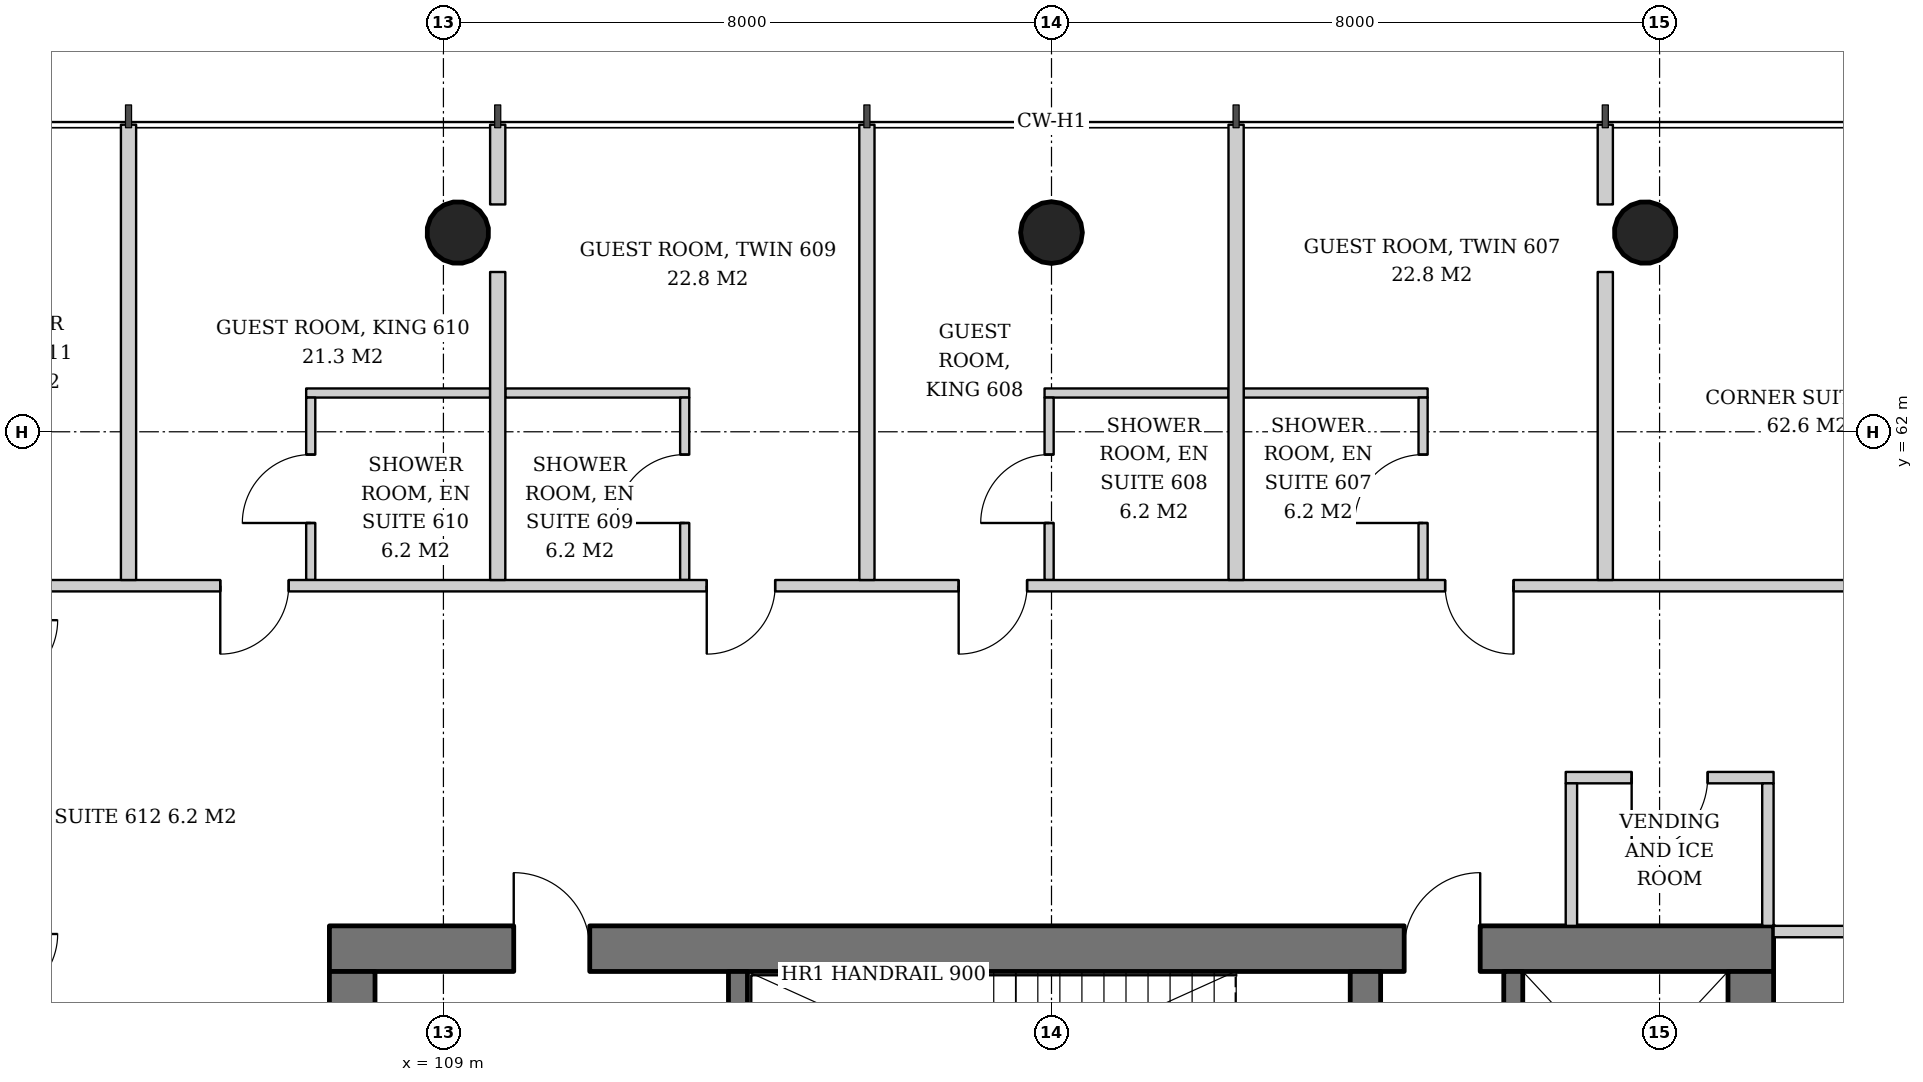
"""IFC4 building model, lengths in metres.
Left out: names, types, materials, properties, quantities, classifications, styles, units other than length and angle.
Written with IfcOpenShell. Run it as: python <this file> out.ifc"""

import sys

from ifc_helpers import new_model, si_unit, direction, frame, frame_2d, origin, origin_2d, place, context, subcontext, project, spatial, rectangle, hollow_circle, extrude, element, fill, save


model = new_model("IFC4")
c1 = context("Model", 3, precision=1e-05, world=origin(), true_north=direction((0.0, 1.0)))
c2 = subcontext(c1, "Body", "Model", "MODEL_VIEW")
j1 = project(units=[si_unit("LENGTHUNIT", "METRE"), si_unit("PLANEANGLEUNIT", "RADIAN")], contexts=[c1])
p1 = place(None, origin())
s1 = spatial("IfcSite", under=j1, at=p1, CompositionType="ELEMENT")
p2 = place(p1, origin())
s2 = spatial("IfcBuilding", under=s1, at=p2, CompositionType="ELEMENT")
p3 = place(p2, frame((0.0, 0.0, 28.6)))
s3 = spatial("IfcBuildingStorey", under=s2, at=p3, CompositionType="ELEMENT", Elevation=28.6)
p4 = place(p3, frame((124.836, 64.672, 0.0), z_axis=(-0.02149908433, -0.04306234503, 0.998841040313), x_axis=(0.894693706707, -0.446680166538, 0.0)))
e1 = element("IfcColumn", 1, at=p4, inside=s3, PredefinedType="COLUMN", context=c2, shape_type="SweptSolid", body=[
    extrude(hollow_circle(Radius=0.406, WallThickness=0.03, at=origin_2d()), origin(), (0.0, 0.0, 1.0), 3.804),
])
p5 = place(p3, frame((117.0, 64.672, 0.0), z_axis=(0.0, -0.043072300418, 0.999071957837), x_axis=(1.0, 0.0, 0.0)))
e2 = element("IfcColumn", 2, at=p5, inside=s3, PredefinedType="COLUMN", context=c2, shape_type="SweptSolid", body=[
    extrude(hollow_circle(Radius=0.406, WallThickness=0.03, at=origin_2d()), origin(), (0.0, 0.0, 1.0), 3.803),
])
p6 = place(p3, frame((109.164, 64.672, 0.0), z_axis=(0.02149908433, -0.04306234503, 0.998841040313), x_axis=(0.894693706707, 0.446680166538, 0.0)))
e3 = element("IfcColumn", 3, at=p6, inside=s3, PredefinedType="COLUMN", context=c2, shape_type="SweptSolid", body=[
    extrude(hollow_circle(Radius=0.406, WallThickness=0.03, at=origin_2d()), origin(), (0.0, 0.0, 1.0), 3.804),
])
p7 = place(p3, frame((107.5, 55.2, 0.0), z_axis=(0.0, 0.0, 1.0), x_axis=(1.0, 0.0, 0.0)))
e4 = element("IfcWall", 4, at=p7, inside=s3, PredefinedType="SHEAR", context=c2, shape_type="SweptSolid", body=[
    extrude(rectangle(XDim=19.0, YDim=0.6, at=frame_2d((9.5, 0.0))), origin(), (0.0, 0.0, 1.0), 3.8),
])
p8 = place(p7, frame((14.14, 0.0, 0.0)))
e5 = element("IfcOpeningElement", 5, at=p8, cuts=e4, PredefinedType="OPENING", context=c2, shape_type="SweptSolid", body=[
    extrude(rectangle(XDim=1.0, YDim=2.1, at=frame_2d((0.5, 1.05))), frame((0.0, 0.31, 0.0), z_axis=(0.0, -1.0, 0.0), x_axis=(1.0, 0.0, 0.0)), (0.0, 0.0, 1.0), 0.62),
])
p9 = place(p7, frame((2.425, 0.0, 0.0)))
e6 = element("IfcOpeningElement", 6, at=p9, cuts=e4, PredefinedType="OPENING", context=c2, shape_type="SweptSolid", body=[
    extrude(rectangle(XDim=1.0, YDim=2.1, at=frame_2d((0.5, 1.05))), frame((0.0, 0.31, 0.0), z_axis=(0.0, -1.0, 0.0), x_axis=(1.0, 0.0, 0.0)), (0.0, 0.0, 1.0), 0.62),
])
p10 = place(p3, frame((107.8, 37.1, 0.0), z_axis=(0.0, 0.0, 1.0), x_axis=(0.0, 1.0, 0.0)))
e7 = element("IfcWall", 7, at=p10, inside=s3, PredefinedType="SHEAR", context=c2, shape_type="SweptSolid", body=[
    extrude(rectangle(XDim=17.8, YDim=0.6, at=frame_2d((8.9, 0.0))), origin(), (0.0, 0.0, 1.0), 3.8),
])
p11 = place(p10, frame((8.0, 0.0, 0.0)))
e8 = element("IfcOpeningElement", 8, at=p11, cuts=e7, PredefinedType="OPENING", context=c2, shape_type="SweptSolid", body=[
    extrude(rectangle(XDim=1.8, YDim=2.4, at=frame_2d((0.9, 1.2))), frame((0.0, 0.31, 0.0), z_axis=(0.0, -1.0, 0.0), x_axis=(1.0, 0.0, 0.0)), (0.0, 0.0, 1.0), 0.62),
])
p12 = place(p3, frame((126.2, 37.1, 0.0), z_axis=(0.0, 0.0, 1.0), x_axis=(0.0, 1.0, 0.0)))
e9 = element("IfcWall", 9, at=p12, inside=s3, PredefinedType="SHEAR", context=c2, shape_type="SweptSolid", body=[
    extrude(rectangle(XDim=17.8, YDim=0.6, at=frame_2d((8.9, 0.0))), origin(), (0.0, 0.0, 1.0), 3.8),
])
p13 = place(p12, frame((8.0, 0.0, 0.0)))
e10 = element("IfcOpeningElement", 10, at=p13, cuts=e9, PredefinedType="OPENING", context=c2, shape_type="SweptSolid", body=[
    extrude(rectangle(XDim=1.8, YDim=2.4, at=frame_2d((0.9, 1.2))), frame((0.0, 0.31, 0.0), z_axis=(0.0, -1.0, 0.0), x_axis=(1.0, 0.0, 0.0)), (0.0, 0.0, 1.0), 0.62),
])
p14 = place(p3, frame((121.13, 52.0, 0.0), z_axis=(0.0, 0.0, 1.0), x_axis=(0.0, 1.0, 0.0)))
e11 = element("IfcWall", 11, at=p14, inside=s3, PredefinedType="SHEAR", context=c2, shape_type="SweptSolid", body=[
    extrude(rectangle(XDim=2.9, YDim=0.4, at=frame_2d((1.45, 0.0))), origin(), (0.0, 0.0, 1.0), 3.8),
])
p15 = place(p14, frame((0.3, 0.0, 0.0)))
e12 = element("IfcOpeningElement", 12, at=p15, cuts=e11, PredefinedType="OPENING", context=c2, shape_type="SweptSolid", body=[
    extrude(rectangle(XDim=1.0, YDim=2.1, at=frame_2d((0.5, 1.05))), frame((0.0, 0.21, 0.0), z_axis=(0.0, -1.0, 0.0), x_axis=(1.0, 0.0, 0.0)), (0.0, 0.0, 1.0), 0.42),
])
p16 = place(p3, frame((112.875, 52.0, 0.0), z_axis=(0.0, 0.0, 1.0), x_axis=(0.0, 1.0, 0.0)))
e13 = element("IfcWall", 13, at=p16, inside=s3, PredefinedType="SHEAR", context=c2, shape_type="SweptSolid", body=[
    extrude(rectangle(XDim=2.9, YDim=0.25, at=frame_2d((1.45, 0.0))), origin(), (0.0, 0.0, 1.0), 3.8),
])
p17 = place(p3, frame((123.075, 52.0, 0.0), z_axis=(0.0, 0.0, 1.0), x_axis=(0.0, 1.0, 0.0)))
e14 = element("IfcWall", 14, at=p17, inside=s3, PredefinedType="SHEAR", context=c2, shape_type="SweptSolid", body=[
    extrude(rectangle(XDim=2.9, YDim=0.25, at=frame_2d((1.45, 0.0))), origin(), (0.0, 0.0, 1.0), 3.8),
])
p18 = place(p17, frame((0.8, 0.0, 0.0)))
e15 = element("IfcOpeningElement", 15, at=p18, cuts=e14, PredefinedType="OPENING", context=c2, shape_type="SweptSolid", body=[
    extrude(rectangle(XDim=1.3, YDim=2.2, at=frame_2d((0.65, 1.1))), frame((0.0, 0.135, 0.0), z_axis=(0.0, -1.0, 0.0), x_axis=(1.0, 0.0, 0.0)), (0.0, 0.0, 1.0), 0.27),
])
p19 = place(p3, frame((126.5, 55.425, 0.0), z_axis=(0.0, 0.0, 1.0), x_axis=(1.0, 0.0, 0.0)))
e16 = element("IfcWall", 16, at=p19, inside=s3, PredefinedType="PARTITIONING", context=c2, shape_type="SweptSolid", body=[
    extrude(rectangle(XDim=1.875, YDim=0.15, at=frame_2d((0.938, 0.0))), origin(), (0.0, 0.0, 1.0), 3.6),
])
p20 = place(p3, frame((126.5, 57.45, 0.0), z_axis=(0.0, 0.0, 1.0), x_axis=(-1.0, 0.0, 0.0)))
e17 = element("IfcWall", 17, at=p20, inside=s3, PredefinedType="PARTITIONING", context=c2, shape_type="SweptSolid", body=[
    extrude(rectangle(XDim=2.735, YDim=0.15, at=frame_2d((1.368, 0.0))), origin(), (0.0, 0.0, 1.0), 2.8),
])
p21 = place(p20, frame((0.867, 0.0, 0.0)))
e18 = element("IfcOpeningElement", 18, at=p21, cuts=e17, PredefinedType="OPENING", context=c2, shape_type="SweptSolid", body=[
    extrude(rectangle(XDim=1.0, YDim=2.1, at=frame_2d((0.5, 1.05))), frame((0.0, 0.085, 0.0), z_axis=(0.0, -1.0, 0.0), x_axis=(1.0, 0.0, 0.0)), (0.0, 0.0, 1.0), 0.17),
])
p22 = place(p3, frame((126.425, 55.5, 0.0), z_axis=(0.0, 0.0, 1.0), x_axis=(0.0, 1.0, 0.0)))
e19 = element("IfcWall", 19, at=p22, inside=s3, PredefinedType="PARTITIONING", context=c2, shape_type="SweptSolid", body=[
    extrude(rectangle(XDim=1.875, YDim=0.15, at=frame_2d((0.938, 0.0))), origin(), (0.0, 0.0, 1.0), 2.8),
])
p23 = place(p3, frame((123.84, 55.5, 0.0), z_axis=(0.0, 0.0, 1.0), x_axis=(0.0, 1.0, 0.0)))
e20 = element("IfcWall", 20, at=p23, inside=s3, PredefinedType="PARTITIONING", context=c2, shape_type="SweptSolid", body=[
    extrude(rectangle(XDim=1.875, YDim=0.15, at=frame_2d((0.938, 0.0))), origin(), (0.0, 0.0, 1.0), 3.6),
])
p24 = place(p3, frame((121.948, 62.51, 0.0), z_axis=(0.0, 0.0, 1.0), x_axis=(-1.0, 0.0, 0.0)))
e21 = element("IfcWall", 21, at=p24, inside=s3, PredefinedType="PARTITIONING", context=c2, shape_type="SweptSolid", body=[
    extrude(rectangle(XDim=2.42, YDim=0.12, at=frame_2d((1.21, 0.0))), origin(), (0.0, 0.0, 1.0), 3.6),
])
p25 = place(p3, frame((121.889, 60.05, 0.0), z_axis=(0.0, 0.0, 1.0), x_axis=(0.0, 1.0, 0.0)))
e22 = element("IfcWall", 22, at=p25, inside=s3, PredefinedType="PARTITIONING", context=c2, shape_type="SweptSolid", body=[
    extrude(rectangle(XDim=2.4, YDim=0.12, at=frame_2d((1.2, 0.0))), origin(), (0.0, 0.0, 1.0), 3.6),
])
p26 = place(p25, frame((0.75, 0.0, 0.0)))
e23 = element("IfcOpeningElement", 23, at=p26, cuts=e22, PredefinedType="OPENING", context=c2, shape_type="SweptSolid", body=[
    extrude(rectangle(XDim=0.9, YDim=2.1, at=frame_2d((0.45, 1.05))), frame((0.0, 0.07, 0.0), z_axis=(0.0, -1.0, 0.0), x_axis=(1.0, 0.0, 0.0)), (0.0, 0.0, 1.0), 0.14),
])
p27 = place(p3, frame((119.329, 62.51, 0.0), z_axis=(0.0, 0.0, 1.0), x_axis=(-1.0, 0.0, 0.0)))
e24 = element("IfcWall", 24, at=p27, inside=s3, PredefinedType="PARTITIONING", context=c2, shape_type="SweptSolid", body=[
    extrude(rectangle(XDim=2.42, YDim=0.12, at=frame_2d((1.21, 0.0))), origin(), (0.0, 0.0, 1.0), 2.847),
])
p28 = place(p3, frame((116.969, 60.05, 0.0), z_axis=(0.0, 0.0, 1.0), x_axis=(0.0, 1.0, 0.0)))
e25 = element("IfcWall", 25, at=p28, inside=s3, PredefinedType="PARTITIONING", context=c2, shape_type="SweptSolid", body=[
    extrude(rectangle(XDim=2.4, YDim=0.12, at=frame_2d((1.2, 0.0))), origin(), (0.0, 0.0, 1.0), 3.6),
])
p29 = place(p28, frame((0.75, 0.0, 0.0)))
e26 = element("IfcOpeningElement", 26, at=p29, cuts=e25, PredefinedType="OPENING", context=c2, shape_type="SweptSolid", body=[
    extrude(rectangle(XDim=0.9, YDim=2.1, at=frame_2d((0.45, 1.05))), frame((0.0, 0.07, 0.0), z_axis=(0.0, -1.0, 0.0), x_axis=(1.0, 0.0, 0.0)), (0.0, 0.0, 1.0), 0.14),
])
p30 = place(p3, frame((112.234, 62.51, 0.0), z_axis=(0.0, 0.0, 1.0), x_axis=(-1.0, 0.0, 0.0)))
e27 = element("IfcWall", 27, at=p30, inside=s3, PredefinedType="PARTITIONING", context=c2, shape_type="SweptSolid", body=[
    extrude(rectangle(XDim=2.42, YDim=0.12, at=frame_2d((1.21, 0.0))), origin(), (0.0, 0.0, 1.0), 2.847),
])
p31 = place(p3, frame((112.174, 60.05, 0.0), z_axis=(0.0, 0.0, 1.0), x_axis=(0.0, 1.0, 0.0)))
e28 = element("IfcWall", 28, at=p31, inside=s3, PredefinedType="PARTITIONING", context=c2, shape_type="SweptSolid", body=[
    extrude(rectangle(XDim=2.4, YDim=0.12, at=frame_2d((1.2, 0.0))), origin(), (0.0, 0.0, 1.0), 3.6),
])
p32 = place(p31, frame((0.75, 0.0, 0.0)))
e29 = element("IfcOpeningElement", 29, at=p32, cuts=e28, PredefinedType="OPENING", context=c2, shape_type="SweptSolid", body=[
    extrude(rectangle(XDim=0.9, YDim=2.1, at=frame_2d((0.45, 1.05))), frame((0.0, 0.07, 0.0), z_axis=(0.0, -1.0, 0.0), x_axis=(1.0, 0.0, 0.0)), (0.0, 0.0, 1.0), 0.14),
])
p33 = place(p3, frame((109.614, 62.51, 0.0), z_axis=(0.0, 0.0, 1.0), x_axis=(-1.0, 0.0, 0.0)))
e30 = element("IfcWall", 30, at=p33, inside=s3, PredefinedType="PARTITIONING", context=c2, shape_type="SweptSolid", body=[
    extrude(rectangle(XDim=2.42, YDim=0.12, at=frame_2d((1.21, 0.0))), origin(), (0.0, 0.0, 1.0), 3.6),
])
p34 = place(p3, frame((107.254, 60.05, 0.0), z_axis=(0.0, 0.0, 1.0), x_axis=(0.0, 1.0, 0.0)))
e31 = element("IfcWall", 31, at=p34, inside=s3, PredefinedType="PARTITIONING", context=c2, shape_type="SweptSolid", body=[
    extrude(rectangle(XDim=2.4, YDim=0.12, at=frame_2d((1.2, 0.0))), origin(), (0.0, 0.0, 1.0), 3.6),
])
p35 = place(p34, frame((0.75, 0.0, 0.0)))
e32 = element("IfcOpeningElement", 32, at=p35, cuts=e31, PredefinedType="OPENING", context=c2, shape_type="SweptSolid", body=[
    extrude(rectangle(XDim=0.9, YDim=2.1, at=frame_2d((0.45, 1.05))), frame((0.0, 0.07, 0.0), z_axis=(0.0, -1.0, 0.0), x_axis=(1.0, 0.0, 0.0)), (0.0, 0.0, 1.0), 0.14),
])
p36 = place(p3, frame((131.05, 59.975, 0.0), z_axis=(0.0, 0.0, 1.0), x_axis=(-1.0, 0.0, 0.0)))
e33 = element("IfcWall", 33, at=p36, inside=s3, PredefinedType="PARTITIONING", context=c2, shape_type="SweptSolid", body=[
    extrude(rectangle(XDim=27.95, YDim=0.15, at=frame_2d((13.975, 0.0))), origin(), (0.0, 0.0, 1.0), 2.8),
])
p37 = place(p36, frame((0.529, 0.0, 0.0)))
e34 = element("IfcOpeningElement", 34, at=p37, cuts=e33, PredefinedType="OPENING", context=c2, shape_type="SweptSolid", body=[
    extrude(rectangle(XDim=0.9, YDim=2.1, at=frame_2d((0.45, 1.05))), frame((0.0, 0.085, 0.0), z_axis=(0.0, -1.0, 0.0), x_axis=(1.0, 0.0, 0.0)), (0.0, 0.0, 1.0), 0.17),
])
p38 = place(p36, frame((7.971, 0.0, 0.0)))
e35 = element("IfcOpeningElement", 35, at=p38, cuts=e33, PredefinedType="OPENING", context=c2, shape_type="SweptSolid", body=[
    extrude(rectangle(XDim=0.9, YDim=2.1, at=frame_2d((0.45, 1.05))), frame((0.0, 0.085, 0.0), z_axis=(0.0, -1.0, 0.0), x_axis=(1.0, 0.0, 0.0)), (0.0, 0.0, 1.0), 0.17),
])
p39 = place(p36, frame((14.371, 0.0, 0.0)))
e36 = element("IfcOpeningElement", 36, at=p39, cuts=e33, PredefinedType="OPENING", context=c2, shape_type="SweptSolid", body=[
    extrude(rectangle(XDim=0.9, YDim=2.1, at=frame_2d((0.45, 1.05))), frame((0.0, 0.085, 0.0), z_axis=(0.0, -1.0, 0.0), x_axis=(1.0, 0.0, 0.0)), (0.0, 0.0, 1.0), 0.17),
])
p40 = place(p36, frame((17.686, 0.0, 0.0)))
e37 = element("IfcOpeningElement", 37, at=p40, cuts=e33, PredefinedType="OPENING", context=c2, shape_type="SweptSolid", body=[
    extrude(rectangle(XDim=0.9, YDim=2.1, at=frame_2d((0.45, 1.05))), frame((0.0, 0.085, 0.0), z_axis=(0.0, -1.0, 0.0), x_axis=(1.0, 0.0, 0.0)), (0.0, 0.0, 1.0), 0.17),
])
p41 = place(p36, frame((24.086, 0.0, 0.0)))
e38 = element("IfcOpeningElement", 38, at=p41, cuts=e33, PredefinedType="OPENING", context=c2, shape_type="SweptSolid", body=[
    extrude(rectangle(XDim=0.9, YDim=2.1, at=frame_2d((0.45, 1.05))), frame((0.0, 0.085, 0.0), z_axis=(0.0, -1.0, 0.0), x_axis=(1.0, 0.0, 0.0)), (0.0, 0.0, 1.0), 0.17),
])
p42 = place(p3, frame((124.286, 60.05, 0.0), z_axis=(0.0, 0.0, 1.0), x_axis=(0.0, 1.0, 0.0)))
e39 = element("IfcWall", 39, at=p42, inside=s3, PredefinedType="PARTITIONING", context=c2, shape_type="SweptSolid", body=[
    extrude(rectangle(XDim=4.052, YDim=0.2, at=frame_2d((2.026, 0.0))), origin(), (0.0, 0.0, 1.0), 3.6),
])
p43 = place(p3, frame((124.286, 64.991, 0.0), z_axis=(0.0, 0.0, 1.0), x_axis=(0.0, 1.0, 0.0)))
e40 = element("IfcWall", 40, at=p43, inside=s3, PredefinedType="PARTITIONING", context=c2, shape_type="SweptSolid", body=[
    extrude(rectangle(XDim=1.049, YDim=0.2, at=frame_2d((0.524, 0.0))), origin(), (0.0, 0.0, 1.0), 3.6),
])
for number, where, z_axis, x_axis in (
    (41, (119.428, 60.05, 0.0), (0.0, 0.0, 1.0), (0.0, 1.0, 0.0)),
    (42, (114.572, 60.05, 0.0), (0.0, 0.0, 1.0), (0.0, 1.0, 0.0)),
):
    element("IfcWall", number, at=place(p3, frame(where, z_axis=z_axis, x_axis=x_axis)), inside=s3, PredefinedType="PARTITIONING", context=c2, shape_type="SweptSolid", body=[
        extrude(rectangle(XDim=5.99, YDim=0.2, at=frame_2d((2.995, 0.0))), origin(), (0.0, 0.0, 1.0), 3.05),
    ])
p44 = place(p3, frame((109.714, 60.05, 0.0), z_axis=(0.0, 0.0, 1.0), x_axis=(0.0, 1.0, 0.0)))
e43 = element("IfcWall", 43, at=p44, inside=s3, PredefinedType="PARTITIONING", context=c2, shape_type="SweptSolid", body=[
    extrude(rectangle(XDim=4.052, YDim=0.2, at=frame_2d((2.026, 0.0))), origin(), (0.0, 0.0, 1.0), 3.6),
])
p45 = place(p3, frame((109.714, 64.991, 0.0), z_axis=(0.0, 0.0, 1.0), x_axis=(0.0, 1.0, 0.0)))
e44 = element("IfcWall", 44, at=p45, inside=s3, PredefinedType="PARTITIONING", context=c2, shape_type="SweptSolid", body=[
    extrude(rectangle(XDim=1.049, YDim=0.2, at=frame_2d((0.524, 0.0))), origin(), (0.0, 0.0, 1.0), 3.6),
])
p46 = place(p3, frame((104.857, 60.05, 0.0), z_axis=(0.0, 0.0, 1.0), x_axis=(0.0, 1.0, 0.0)))
e45 = element("IfcWall", 45, at=p46, inside=s3, PredefinedType="PARTITIONING", context=c2, shape_type="SweptSolid", body=[
    extrude(rectangle(XDim=5.99, YDim=0.2, at=frame_2d((2.995, 0.0))), origin(), (0.0, 0.0, 1.0), 3.05),
])
p47 = place(p8, origin())
e46 = element("IfcDoor", 46, at=p47, inside=s3, OperationType="SINGLE_SWING_RIGHT", PredefinedType="DOOR", context=c2, shape_type="SweptSolid", body=[
    extrude(rectangle(XDim=1.0, YDim=2.1, at=frame_2d((0.5, 1.05))), frame((0.0, 0.025, 0.0), z_axis=(0.0, -1.0, 0.0), x_axis=(1.0, 0.0, 0.0)), (0.0, 0.0, 1.0), 0.05),
])
fill(e5, e46)
p48 = place(p9, origin())
e47 = element("IfcDoor", 47, at=p48, inside=s3, OperationType="SINGLE_SWING_LEFT", PredefinedType="DOOR", context=c2, shape_type="SweptSolid", body=[
    extrude(rectangle(XDim=1.0, YDim=2.1, at=frame_2d((0.5, 1.05))), frame((0.0, -0.24, 0.0), z_axis=(0.0, -1.0, 0.0), x_axis=(1.0, 0.0, 0.0)), (0.0, 0.0, 1.0), 0.05),
])
fill(e6, e47)
p49 = place(p21, origin())
e48 = element("IfcDoor", 48, at=p49, inside=s3, OperationType="SINGLE_SWING_RIGHT", PredefinedType="DOOR", context=c2, shape_type="SweptSolid", body=[
    extrude(rectangle(XDim=1.0, YDim=2.1, at=frame_2d((0.5, 1.05))), frame((0.0, 0.025, 0.0), z_axis=(0.0, -1.0, 0.0), x_axis=(1.0, 0.0, 0.0)), (0.0, 0.0, 1.0), 0.05),
])
fill(e18, e48)
p50 = place(p26, origin())
e49 = element("IfcDoor", 49, at=p50, inside=s3, OperationType="SINGLE_SWING_LEFT", PredefinedType="DOOR", context=c2, shape_type="SweptSolid", body=[
    extrude(rectangle(XDim=0.9, YDim=2.1, at=frame_2d((0.45, 1.05))), frame((0.0, 0.025, 0.0), z_axis=(0.0, -1.0, 0.0), x_axis=(1.0, 0.0, 0.0)), (0.0, 0.0, 1.0), 0.05),
])
fill(e23, e49)
p51 = place(p29, origin())
e50 = element("IfcDoor", 50, at=p51, inside=s3, OperationType="SINGLE_SWING_LEFT", PredefinedType="DOOR", context=c2, shape_type="SweptSolid", body=[
    extrude(rectangle(XDim=0.9, YDim=2.1, at=frame_2d((0.45, 1.05))), frame((0.0, 0.025, 0.0), z_axis=(0.0, -1.0, 0.0), x_axis=(1.0, 0.0, 0.0)), (0.0, 0.0, 1.0), 0.05),
])
fill(e26, e50)
p52 = place(p32, origin())
e51 = element("IfcDoor", 51, at=p52, inside=s3, OperationType="SINGLE_SWING_LEFT", PredefinedType="DOOR", context=c2, shape_type="SweptSolid", body=[
    extrude(rectangle(XDim=0.9, YDim=2.1, at=frame_2d((0.45, 1.05))), frame((0.0, 0.025, 0.0), z_axis=(0.0, -1.0, 0.0), x_axis=(1.0, 0.0, 0.0)), (0.0, 0.0, 1.0), 0.05),
])
fill(e29, e51)
p53 = place(p35, origin())
e52 = element("IfcDoor", 52, at=p53, inside=s3, OperationType="SINGLE_SWING_LEFT", PredefinedType="DOOR", context=c2, shape_type="SweptSolid", body=[
    extrude(rectangle(XDim=0.9, YDim=2.1, at=frame_2d((0.45, 1.05))), frame((0.0, 0.025, 0.0), z_axis=(0.0, -1.0, 0.0), x_axis=(1.0, 0.0, 0.0)), (0.0, 0.0, 1.0), 0.05),
])
fill(e32, e52)
p54 = place(p38, origin())
e53 = element("IfcDoor", 53, at=p54, inside=s3, OperationType="SINGLE_SWING_LEFT", PredefinedType="DOOR", context=c2, shape_type="SweptSolid", body=[
    extrude(rectangle(XDim=0.9, YDim=2.1, at=frame_2d((0.45, 1.05))), frame((0.0, 0.025, 0.0), z_axis=(0.0, -1.0, 0.0), x_axis=(1.0, 0.0, 0.0)), (0.0, 0.0, 1.0), 0.05),
])
fill(e35, e53)
p55 = place(p39, origin())
e54 = element("IfcDoor", 54, at=p55, inside=s3, OperationType="SINGLE_SWING_RIGHT", PredefinedType="DOOR", context=c2, shape_type="SweptSolid", body=[
    extrude(rectangle(XDim=0.9, YDim=2.1, at=frame_2d((0.45, 1.05))), frame((0.0, 0.025, 0.0), z_axis=(0.0, -1.0, 0.0), x_axis=(1.0, 0.0, 0.0)), (0.0, 0.0, 1.0), 0.05),
])
fill(e36, e54)
p56 = place(p40, origin())
e55 = element("IfcDoor", 55, at=p56, inside=s3, OperationType="SINGLE_SWING_RIGHT", PredefinedType="DOOR", context=c2, shape_type="SweptSolid", body=[
    extrude(rectangle(XDim=0.9, YDim=2.1, at=frame_2d((0.45, 1.05))), frame((0.0, 0.025, 0.0), z_axis=(0.0, -1.0, 0.0), x_axis=(1.0, 0.0, 0.0)), (0.0, 0.0, 1.0), 0.05),
])
fill(e37, e55)
p57 = place(p41, origin())
e56 = element("IfcDoor", 56, at=p57, inside=s3, OperationType="SINGLE_SWING_RIGHT", PredefinedType="DOOR", context=c2, shape_type="SweptSolid", body=[
    extrude(rectangle(XDim=0.9, YDim=2.1, at=frame_2d((0.45, 1.05))), frame((0.0, 0.025, 0.0), z_axis=(0.0, -1.0, 0.0), x_axis=(1.0, 0.0, 0.0)), (0.0, 0.0, 1.0), 0.05),
])
fill(e38, e56)
save(model, sys.argv[1])
